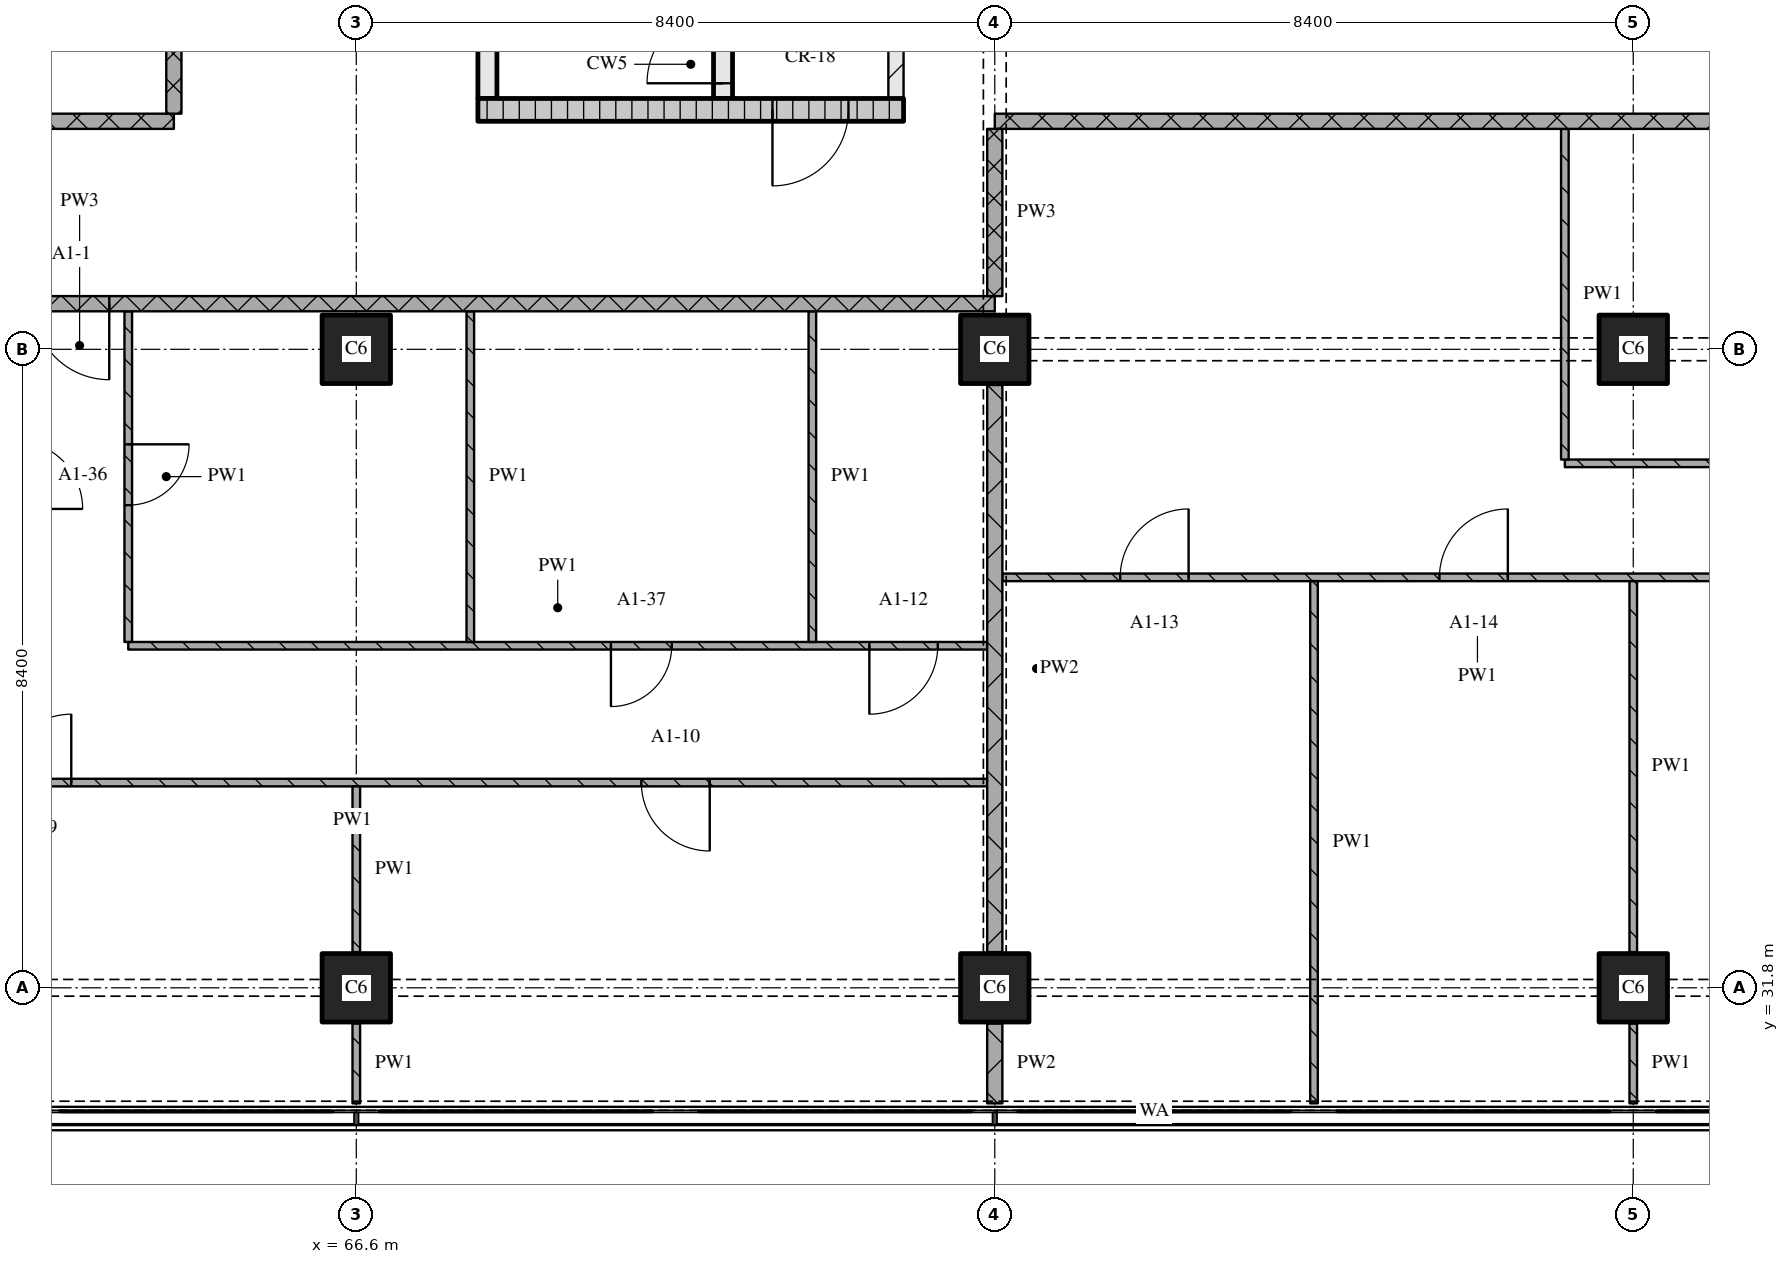
"""IFC4 building model, lengths in metres.
Left out: names, types, materials, properties, quantities, classifications, styles, units other than length and angle.
Written with IfcOpenShell. Run it as: python <this file> out.ifc"""

import sys

from ifc_helpers import new_model, si_unit, direction, frame, frame_2d, origin, origin_2d, place, context, subcontext, project, spatial, rectangle, extrude, element, fill, save


model = new_model("IFC4")
c1 = context("Model", 3, precision=1e-05, world=origin(), true_north=direction((0.0, 1.0)))
c2 = subcontext(c1, "Body", "Model", "MODEL_VIEW")
j1 = project(units=[si_unit("LENGTHUNIT", "METRE"), si_unit("PLANEANGLEUNIT", "RADIAN")], contexts=[c1])
p1 = place(None, origin())
s1 = spatial("IfcSite", under=j1, at=p1, CompositionType="ELEMENT")
p2 = place(p1, origin())
s2 = spatial("IfcBuilding", under=s1, at=p2, CompositionType="ELEMENT")
p3 = place(p2, frame((0.0, 0.0, 37.2)))
s3 = spatial("IfcBuildingStorey", under=s2, at=p3, CompositionType="ELEMENT", Elevation=37.2)
for number, where, z_axis, x_axis in (
    (1, (66.6, 31.8, 0.0), (0.0, 0.0, 1.0), (1.0, 0.0, 0.0)),
    (2, (66.6, 40.2, 0.0), (0.0, 0.0, 1.0), (1.0, 0.0, 0.0)),
    (3, (75.0, 31.8, 0.0), (0.0, 0.0, 1.0), (1.0, 0.0, 0.0)),
    (4, (75.0, 40.2, 0.0), (0.0, 0.0, 1.0), (1.0, 0.0, 0.0)),
    (5, (83.4, 31.8, 0.0), (0.0, 0.0, 1.0), (1.0, 0.0, 0.0)),
    (6, (83.4, 40.2, 0.0), (0.0, 0.0, 1.0), (1.0, 0.0, 0.0)),
):
    element("IfcColumn", number, at=place(p3, frame(where, z_axis=z_axis, x_axis=x_axis)), inside=s3, PredefinedType="COLUMN", context=c2, shape_type="SweptSolid", body=[
        extrude(rectangle(XDim=0.9, YDim=0.9, at=origin_2d()), origin(), (0.0, 0.0, 1.0), 3.6),
    ])
p4 = place(p3, frame((68.2, 43.35, 0.0), z_axis=(0.0, 0.0, 1.0), x_axis=(1.0, 0.0, 0.0)))
e7 = element("IfcWall", 7, at=p4, inside=s3, PredefinedType="SOLIDWALL", context=c2, shape_type="SweptSolid", body=[
    extrude(rectangle(XDim=5.6, YDim=0.3, at=frame_2d((2.8, 0.0))), origin(), (0.0, 0.0, 1.0), 3.32),
])
p5 = place(p4, frame((3.875, 0.0, 0.0)))
e8 = element("IfcOpeningElement", 8, at=p5, cuts=e7, PredefinedType="OPENING", context=c2, shape_type="SweptSolid", body=[
    extrude(rectangle(XDim=1.0, YDim=2.1, at=frame_2d((0.5, 1.05))), frame((0.0, 0.16, 0.0), z_axis=(0.0, -1.0, 0.0), x_axis=(1.0, 0.0, 0.0)), (0.0, 0.0, 1.0), 0.32),
])
p6 = place(p3, frame((68.325, 43.5, 0.0), z_axis=(0.0, 0.0, 1.0), x_axis=(0.0, 1.0, 0.0)))
e9 = element("IfcWall", 9, at=p6, inside=s3, PredefinedType="SOLIDWALL", context=c2, shape_type="SweptSolid", body=[
    extrude(rectangle(XDim=6.9, YDim=0.25, at=frame_2d((3.45, 0.0))), origin(), (0.0, 0.0, 1.0), 3.32),
])
p7 = place(p3, frame((71.425, 43.5, 0.0), z_axis=(0.0, 0.0, 1.0), x_axis=(0.0, 1.0, 0.0)))
e10 = element("IfcWall", 10, at=p7, inside=s3, PredefinedType="SOLIDWALL", context=c2, shape_type="SweptSolid", body=[
    extrude(rectangle(XDim=6.9, YDim=0.25, at=frame_2d((3.45, 0.0))), origin(), (0.0, 0.0, 1.0), 3.32),
])
p8 = place(p7, frame((0.2, 0.0, 0.0)))
e11 = element("IfcOpeningElement", 11, at=p8, cuts=e10, PredefinedType="OPENING", context=c2, shape_type="SweptSolid", body=[
    extrude(rectangle(XDim=1.0, YDim=2.1, at=frame_2d((0.5, 1.05))), frame((0.0, 0.135, 0.0), z_axis=(0.0, -1.0, 0.0), x_axis=(1.0, 0.0, 0.0)), (0.0, 0.0, 1.0), 0.27),
])
p9 = place(p3, frame((73.7, 43.5, 0.0), z_axis=(0.0, 0.0, 1.0), x_axis=(0.0, 1.0, 0.0)))
e12 = element("IfcWall", 12, at=p9, inside=s3, PredefinedType="PARTITIONING", context=c2, shape_type="SweptSolid", body=[
    extrude(rectangle(XDim=6.9, YDim=0.2, at=frame_2d((3.45, 0.0))), origin(), (0.0, 0.0, 1.0), 3.32),
])
p10 = place(p9, frame((1.0, 0.0, 0.0)))
e13 = element("IfcOpeningElement", 13, at=p10, cuts=e12, PredefinedType="OPENING", context=c2, shape_type="SweptSolid", body=[
    extrude(rectangle(XDim=1.0, YDim=2.1, at=frame_2d((0.5, 1.05))), frame((0.0, 0.11, 0.0), z_axis=(0.0, -1.0, 0.0), x_axis=(1.0, 0.0, 0.0)), (0.0, 0.0, 1.0), 0.22),
])
p11 = place(p3, frame((74.9, 34.5, 0.0), z_axis=(0.0, 0.0, 1.0), x_axis=(-1.0, 0.0, 0.0)))
e14 = element("IfcWall", 14, at=p11, inside=s3, PredefinedType="PARTITIONING", context=c2, shape_type="SweptSolid", body=[
    extrude(rectangle(XDim=16.7, YDim=0.1, at=frame_2d((8.35, 0.0))), origin(), (0.0, 0.0, 1.0), 3.32),
])
p12 = place(p11, frame((3.65, 0.0, 0.0)))
e15 = element("IfcOpeningElement", 15, at=p12, cuts=e14, PredefinedType="OPENING", context=c2, shape_type="SweptSolid", body=[
    extrude(rectangle(XDim=0.9, YDim=2.1, at=frame_2d((0.45, 1.05))), frame((0.0, 0.06, 0.0), z_axis=(0.0, -1.0, 0.0), x_axis=(1.0, 0.0, 0.0)), (0.0, 0.0, 1.0), 0.12),
])
p13 = place(p11, frame((12.05, 0.0, 0.0)))
e16 = element("IfcOpeningElement", 16, at=p13, cuts=e14, PredefinedType="OPENING", context=c2, shape_type="SweptSolid", body=[
    extrude(rectangle(XDim=0.9, YDim=2.1, at=frame_2d((0.45, 1.05))), frame((0.0, 0.06, 0.0), z_axis=(0.0, -1.0, 0.0), x_axis=(1.0, 0.0, 0.0)), (0.0, 0.0, 1.0), 0.12),
])
p14 = place(p3, frame((63.6, 36.3, 0.0), z_axis=(0.0, 0.0, 1.0), x_axis=(1.0, 0.0, 0.0)))
e17 = element("IfcWall", 17, at=p14, inside=s3, PredefinedType="PARTITIONING", context=c2, shape_type="SweptSolid", body=[
    extrude(rectangle(XDim=11.3, YDim=0.1, at=frame_2d((5.65, 0.0))), origin(), (0.0, 0.0, 1.0), 3.32),
])
p15 = place(p14, frame((6.35, 0.0, 0.0)))
e18 = element("IfcOpeningElement", 18, at=p15, cuts=e17, PredefinedType="OPENING", context=c2, shape_type="SweptSolid", body=[
    extrude(rectangle(XDim=0.8, YDim=2.1, at=frame_2d((0.4, 1.05))), frame((0.0, 0.06, 0.0), z_axis=(0.0, -1.0, 0.0), x_axis=(1.0, 0.0, 0.0)), (0.0, 0.0, 1.0), 0.12),
])
p16 = place(p14, frame((9.75, 0.0, 0.0)))
e19 = element("IfcOpeningElement", 19, at=p16, cuts=e17, PredefinedType="OPENING", context=c2, shape_type="SweptSolid", body=[
    extrude(rectangle(XDim=0.9, YDim=2.1, at=frame_2d((0.45, 1.05))), frame((0.0, 0.06, 0.0), z_axis=(0.0, -1.0, 0.0), x_axis=(1.0, 0.0, 0.0)), (0.0, 0.0, 1.0), 0.12),
])
p17 = place(p3, frame((87.6, 37.2, 0.0), z_axis=(0.0, 0.0, 1.0), x_axis=(-1.0, 0.0, 0.0)))
e20 = element("IfcWall", 20, at=p17, inside=s3, PredefinedType="PARTITIONING", context=c2, shape_type="SweptSolid", body=[
    extrude(rectangle(XDim=12.5, YDim=0.1, at=frame_2d((6.25, 0.0))), origin(), (0.0, 0.0, 1.0), 3.32),
])
p18 = place(p17, frame((5.85, 0.0, 0.0)))
e21 = element("IfcOpeningElement", 21, at=p18, cuts=e20, PredefinedType="OPENING", context=c2, shape_type="SweptSolid", body=[
    extrude(rectangle(XDim=0.9, YDim=2.1, at=frame_2d((0.45, 1.05))), frame((0.0, 0.06, 0.0), z_axis=(0.0, -1.0, 0.0), x_axis=(1.0, 0.0, 0.0)), (0.0, 0.0, 1.0), 0.12),
])
p19 = place(p17, frame((10.05, 0.0, 0.0)))
e22 = element("IfcOpeningElement", 22, at=p19, cuts=e20, PredefinedType="OPENING", context=c2, shape_type="SweptSolid", body=[
    extrude(rectangle(XDim=0.9, YDim=2.1, at=frame_2d((0.45, 1.05))), frame((0.0, 0.06, 0.0), z_axis=(0.0, -1.0, 0.0), x_axis=(1.0, 0.0, 0.0)), (0.0, 0.0, 1.0), 0.12),
])
p20 = place(p3, frame((82.5, 38.7, 0.0), z_axis=(0.0, 0.0, 1.0), x_axis=(1.0, 0.0, 0.0)))
e23 = element("IfcWall", 23, at=p20, inside=s3, PredefinedType="PARTITIONING", context=c2, shape_type="SweptSolid", body=[
    extrude(rectangle(XDim=9.9, YDim=0.1, at=frame_2d((4.95, 0.0))), origin(), (0.0, 0.0, 1.0), 3.32),
])
p21 = place(p3, frame((75.0, 40.8, 0.0), z_axis=(0.0, 0.0, 1.0), x_axis=(-1.0, 0.0, 0.0)))
e24 = element("IfcWall", 24, at=p21, inside=s3, PredefinedType="PARTITIONING", context=c2, shape_type="SweptSolid", body=[
    extrude(rectangle(XDim=24.08, YDim=0.2, at=frame_2d((12.04, 0.0))), origin(), (0.0, 0.0, 1.0), 3.32),
])
p22 = place(p21, frame((11.65, 0.0, 0.0)))
e25 = element("IfcOpeningElement", 25, at=p22, cuts=e24, PredefinedType="OPENING", context=c2, shape_type="SweptSolid", body=[
    extrude(rectangle(XDim=1.0, YDim=2.1, at=frame_2d((0.5, 1.05))), frame((0.0, 0.11, 0.0), z_axis=(0.0, -1.0, 0.0), x_axis=(1.0, 0.0, 0.0)), (0.0, 0.0, 1.0), 0.22),
])
p23 = place(p3, frame((48.28, 43.2, 0.0), z_axis=(0.0, 0.0, 1.0), x_axis=(1.0, 0.0, 0.0)))
e26 = element("IfcWall", 26, at=p23, inside=s3, PredefinedType="PARTITIONING", context=c2, shape_type="SweptSolid", body=[
    extrude(rectangle(XDim=15.92, YDim=0.2, at=frame_2d((7.96, 0.0))), origin(), (0.0, 0.0, 1.0), 3.32),
])
p24 = place(p3, frame((100.2, 43.2, 0.0), z_axis=(0.0, 0.0, 1.0), x_axis=(-1.0, 0.0, 0.0)))
e27 = element("IfcWall", 27, at=p24, inside=s3, PredefinedType="PARTITIONING", context=c2, shape_type="SweptSolid", body=[
    extrude(rectangle(XDim=25.2, YDim=0.2, at=frame_2d((12.6, 0.0))), origin(), (0.0, 0.0, 1.0), 3.32),
])
p25 = place(p24, frame((6.55, 0.0, 0.0)))
e28 = element("IfcOpeningElement", 28, at=p25, cuts=e27, PredefinedType="OPENING", context=c2, shape_type="SweptSolid", body=[
    extrude(rectangle(XDim=1.0, YDim=2.1, at=frame_2d((0.5, 1.05))), frame((0.0, 0.11, 0.0), z_axis=(0.0, -1.0, 0.0), x_axis=(1.0, 0.0, 0.0)), (0.0, 0.0, 1.0), 0.22),
])
p26 = place(p3, frame((63.6, 40.7, 0.0), z_axis=(0.0, 0.0, 1.0), x_axis=(0.0, -1.0, 0.0)))
e29 = element("IfcWall", 29, at=p26, inside=s3, PredefinedType="PARTITIONING", context=c2, shape_type="SweptSolid", body=[
    extrude(rectangle(XDim=4.35, YDim=0.1, at=frame_2d((2.175, 0.0))), origin(), (0.0, 0.0, 1.0), 3.32),
])
p27 = place(p26, frame((1.75, 0.0, 0.0)))
e30 = element("IfcOpeningElement", 30, at=p27, cuts=e29, PredefinedType="OPENING", context=c2, shape_type="SweptSolid", body=[
    extrude(rectangle(XDim=0.8, YDim=2.1, at=frame_2d((0.4, 1.05))), frame((0.0, 0.06, 0.0), z_axis=(0.0, -1.0, 0.0), x_axis=(1.0, 0.0, 0.0)), (0.0, 0.0, 1.0), 0.12),
])
p28 = place(p3, frame((64.2, 43.3, 0.0), z_axis=(0.0, 0.0, 1.0), x_axis=(0.0, 1.0, 0.0)))
e31 = element("IfcWall", 31, at=p28, inside=s3, PredefinedType="PARTITIONING", context=c2, shape_type="SweptSolid", body=[
    extrude(rectangle(XDim=32.02, YDim=0.2, at=frame_2d((16.01, 0.0))), origin(), (0.0, 0.0, 1.0), 3.32),
])
p29 = place(p28, frame((8.55, 0.0, 0.0)))
e32 = element("IfcOpeningElement", 32, at=p29, cuts=e31, PredefinedType="OPENING", context=c2, shape_type="SweptSolid", body=[
    extrude(rectangle(XDim=1.0, YDim=2.1, at=frame_2d((0.5, 1.05))), frame((0.0, 0.11, 0.0), z_axis=(0.0, -1.0, 0.0), x_axis=(1.0, 0.0, 0.0)), (0.0, 0.0, 1.0), 0.22),
])
p30 = place(p28, frame((25.95, 0.0, 0.0)))
e33 = element("IfcOpeningElement", 33, at=p30, cuts=e31, PredefinedType="OPENING", context=c2, shape_type="SweptSolid", body=[
    extrude(rectangle(XDim=1.0, YDim=2.1, at=frame_2d((0.5, 1.05))), frame((0.0, 0.11, 0.0), z_axis=(0.0, -1.0, 0.0), x_axis=(1.0, 0.0, 0.0)), (0.0, 0.0, 1.0), 0.22),
])
p31 = place(p3, frame((66.6, 31.33, 0.0), z_axis=(0.0, 0.0, 1.0), x_axis=(0.0, -1.0, 0.0)))
e34 = element("IfcWall", 34, at=p31, inside=s3, PredefinedType="PARTITIONING", context=c2, shape_type="SweptSolid", body=[
    extrude(rectangle(XDim=1.05, YDim=0.1, at=frame_2d((0.525, 0.0))), origin(), (0.0, 0.0, 1.0), 3.32),
])
p32 = place(p3, frame((66.6, 34.45, 0.0), z_axis=(0.0, 0.0, 1.0), x_axis=(0.0, -1.0, 0.0)))
e35 = element("IfcWall", 35, at=p32, inside=s3, PredefinedType="PARTITIONING", context=c2, shape_type="SweptSolid", body=[
    extrude(rectangle(XDim=2.18, YDim=0.1, at=frame_2d((1.09, 0.0))), origin(), (0.0, 0.0, 1.0), 3.32),
])
for number, where, z_axis, x_axis in (
    (36, (68.1, 40.7, 0.0), (0.0, 0.0, 1.0), (0.0, -1.0, 0.0)),
    (37, (72.6, 40.7, 0.0), (0.0, 0.0, 1.0), (0.0, -1.0, 0.0)),
):
    element("IfcWall", number, at=place(p3, frame(where, z_axis=z_axis, x_axis=x_axis)), inside=s3, PredefinedType="PARTITIONING", context=c2, shape_type="SweptSolid", body=[
        extrude(rectangle(XDim=4.35, YDim=0.1, at=frame_2d((2.175, 0.0))), origin(), (0.0, 0.0, 1.0), 3.32),
    ])
p33 = place(p3, frame((75.0, 43.1, 0.0), z_axis=(0.0, 0.0, 1.0), x_axis=(0.0, -1.0, 0.0)))
e38 = element("IfcWall", 38, at=p33, inside=s3, PredefinedType="PARTITIONING", context=c2, shape_type="SweptSolid", body=[
    extrude(rectangle(XDim=2.2, YDim=0.2, at=frame_2d((1.1, 0.0))), origin(), (0.0, 0.0, 1.0), 2.43),
])
p34 = place(p3, frame((75.0, 31.33, 0.0), z_axis=(0.0, 0.0, 1.0), x_axis=(0.0, -1.0, 0.0)))
e39 = element("IfcWall", 39, at=p34, inside=s3, PredefinedType="PARTITIONING", context=c2, shape_type="SweptSolid", body=[
    extrude(rectangle(XDim=1.05, YDim=0.2, at=frame_2d((0.525, 0.0))), origin(), (0.0, 0.0, 1.0), 3.32),
])
p35 = place(p3, frame((75.0, 39.73, 0.0), z_axis=(0.0, 0.0, 1.0), x_axis=(0.0, -1.0, 0.0)))
e40 = element("IfcWall", 40, at=p35, inside=s3, PredefinedType="PARTITIONING", context=c2, shape_type="SweptSolid", body=[
    extrude(rectangle(XDim=7.46, YDim=0.2, at=frame_2d((3.73, 0.0))), origin(), (0.0, 0.0, 1.0), 2.83),
])
p36 = place(p3, frame((79.2, 37.15, 0.0), z_axis=(0.0, 0.0, 1.0), x_axis=(0.0, -1.0, 0.0)))
e41 = element("IfcWall", 41, at=p36, inside=s3, PredefinedType="PARTITIONING", context=c2, shape_type="SweptSolid", body=[
    extrude(rectangle(XDim=6.87, YDim=0.1, at=frame_2d((3.435, 0.0))), origin(), (0.0, 0.0, 1.0), 3.32),
])
p37 = place(p3, frame((82.5, 43.1, 0.0), z_axis=(0.0, 0.0, 1.0), x_axis=(0.0, -1.0, 0.0)))
e42 = element("IfcWall", 42, at=p37, inside=s3, PredefinedType="PARTITIONING", context=c2, shape_type="SweptSolid", body=[
    extrude(rectangle(XDim=4.35, YDim=0.1, at=frame_2d((2.175, 0.0))), origin(), (0.0, 0.0, 1.0), 3.32),
])
p38 = place(p3, frame((83.4, 31.33, 0.0), z_axis=(0.0, 0.0, 1.0), x_axis=(0.0, -1.0, 0.0)))
e43 = element("IfcWall", 43, at=p38, inside=s3, PredefinedType="PARTITIONING", context=c2, shape_type="SweptSolid", body=[
    extrude(rectangle(XDim=1.05, YDim=0.1, at=frame_2d((0.525, 0.0))), origin(), (0.0, 0.0, 1.0), 3.32),
])
p39 = place(p3, frame((83.4, 37.15, 0.0), z_axis=(0.0, 0.0, 1.0), x_axis=(0.0, -1.0, 0.0)))
e44 = element("IfcWall", 44, at=p39, inside=s3, PredefinedType="PARTITIONING", context=c2, shape_type="SweptSolid", body=[
    extrude(rectangle(XDim=4.88, YDim=0.1, at=frame_2d((2.44, 0.0))), origin(), (0.0, 0.0, 1.0), 3.32),
])
p40 = place(p5, origin())
e45 = element("IfcDoor", 45, at=p40, inside=s3, OperationType="SINGLE_SWING_RIGHT", PredefinedType="DOOR", context=c2, shape_type="SweptSolid", body=[
    extrude(rectangle(XDim=1.0, YDim=2.1, at=frame_2d((0.5, 1.05))), frame((0.0, 0.025, 0.0), z_axis=(0.0, -1.0, 0.0), x_axis=(1.0, 0.0, 0.0)), (0.0, 0.0, 1.0), 0.05),
])
fill(e8, e45)
p41 = place(p8, origin())
e46 = element("IfcDoor", 46, at=p41, inside=s3, OperationType="SINGLE_SWING_LEFT", PredefinedType="DOOR", context=c2, shape_type="SweptSolid", body=[
    extrude(rectangle(XDim=1.0, YDim=2.1, at=frame_2d((0.5, 1.05))), frame((0.0, 0.025, 0.0), z_axis=(0.0, -1.0, 0.0), x_axis=(1.0, 0.0, 0.0)), (0.0, 0.0, 1.0), 0.05),
])
fill(e11, e46)
p42 = place(p12, origin())
e47 = element("IfcDoor", 47, at=p42, inside=s3, OperationType="SINGLE_SWING_LEFT", PredefinedType="DOOR", context=c2, shape_type="SweptSolid", body=[
    extrude(rectangle(XDim=0.9, YDim=2.1, at=frame_2d((0.45, 1.05))), frame((0.0, 0.025, 0.0), z_axis=(0.0, -1.0, 0.0), x_axis=(1.0, 0.0, 0.0)), (0.0, 0.0, 1.0), 0.05),
])
fill(e15, e47)
p43 = place(p13, origin())
e48 = element("IfcDoor", 48, at=p43, inside=s3, OperationType="SINGLE_SWING_RIGHT", PredefinedType="DOOR", context=c2, shape_type="SweptSolid", body=[
    extrude(rectangle(XDim=0.9, YDim=2.1, at=frame_2d((0.45, 1.05))), frame((0.0, 0.025, 0.0), z_axis=(0.0, -1.0, 0.0), x_axis=(1.0, 0.0, 0.0)), (0.0, 0.0, 1.0), 0.05),
])
fill(e16, e48)
p44 = place(p15, origin())
e49 = element("IfcDoor", 49, at=p44, inside=s3, OperationType="SINGLE_SWING_RIGHT", PredefinedType="DOOR", context=c2, shape_type="SweptSolid", body=[
    extrude(rectangle(XDim=0.8, YDim=2.1, at=frame_2d((0.4, 1.05))), frame((0.0, 0.025, 0.0), z_axis=(0.0, -1.0, 0.0), x_axis=(1.0, 0.0, 0.0)), (0.0, 0.0, 1.0), 0.05),
])
fill(e18, e49)
p45 = place(p16, origin())
e50 = element("IfcDoor", 50, at=p45, inside=s3, OperationType="SINGLE_SWING_RIGHT", PredefinedType="DOOR", context=c2, shape_type="SweptSolid", body=[
    extrude(rectangle(XDim=0.9, YDim=2.1, at=frame_2d((0.45, 1.05))), frame((0.0, 0.025, 0.0), z_axis=(0.0, -1.0, 0.0), x_axis=(1.0, 0.0, 0.0)), (0.0, 0.0, 1.0), 0.05),
])
fill(e19, e50)
p46 = place(p18, origin())
e51 = element("IfcDoor", 51, at=p46, inside=s3, OperationType="SINGLE_SWING_RIGHT", PredefinedType="DOOR", context=c2, shape_type="SweptSolid", body=[
    extrude(rectangle(XDim=0.9, YDim=2.1, at=frame_2d((0.45, 1.05))), frame((0.0, 0.025, 0.0), z_axis=(0.0, -1.0, 0.0), x_axis=(1.0, 0.0, 0.0)), (0.0, 0.0, 1.0), 0.05),
])
fill(e21, e51)
p47 = place(p19, origin())
e52 = element("IfcDoor", 52, at=p47, inside=s3, OperationType="SINGLE_SWING_RIGHT", PredefinedType="DOOR", context=c2, shape_type="SweptSolid", body=[
    extrude(rectangle(XDim=0.9, YDim=2.1, at=frame_2d((0.45, 1.05))), frame((0.0, 0.025, 0.0), z_axis=(0.0, -1.0, 0.0), x_axis=(1.0, 0.0, 0.0)), (0.0, 0.0, 1.0), 0.05),
])
fill(e22, e52)
p48 = place(p22, origin())
e53 = element("IfcDoor", 53, at=p48, inside=s3, OperationType="SINGLE_SWING_LEFT", PredefinedType="DOOR", context=c2, shape_type="SweptSolid", body=[
    extrude(rectangle(XDim=1.0, YDim=2.1, at=frame_2d((0.5, 1.05))), frame((0.0, 0.025, 0.0), z_axis=(0.0, -1.0, 0.0), x_axis=(1.0, 0.0, 0.0)), (0.0, 0.0, 1.0), 0.05),
])
fill(e25, e53)
p49 = place(p27, origin())
e54 = element("IfcDoor", 54, at=p49, inside=s3, OperationType="SINGLE_SWING_LEFT", PredefinedType="DOOR", context=c2, shape_type="SweptSolid", body=[
    extrude(rectangle(XDim=0.8, YDim=2.1, at=frame_2d((0.4, 1.05))), frame((0.0, 0.025, 0.0), z_axis=(0.0, -1.0, 0.0), x_axis=(1.0, 0.0, 0.0)), (0.0, 0.0, 1.0), 0.05),
])
fill(e30, e54)
save(model, sys.argv[1])
